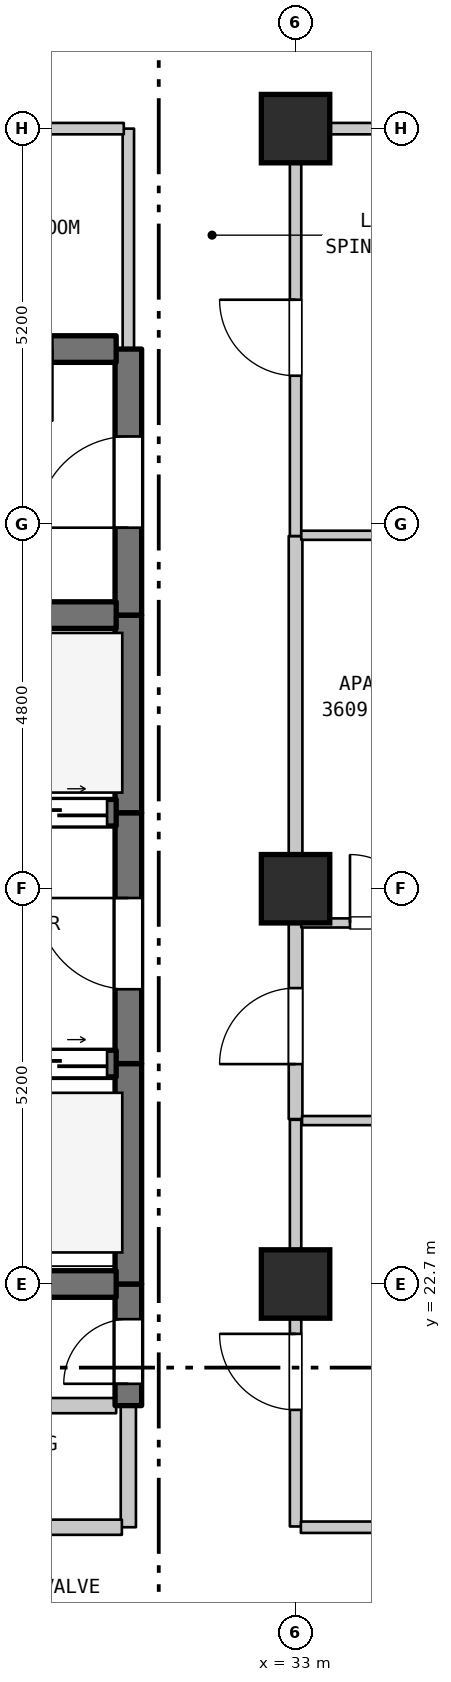
"""IFC4 building model, lengths in metres.
Left out: names, types, materials, properties, quantities, classifications, styles, units other than length and angle.
Written with IfcOpenShell. Run it as: python <this file> out.ifc"""

import sys

from ifc_helpers import new_model, si_unit, direction, frame, frame_2d, origin, origin_2d, place, context, subcontext, project, spatial, rectangle, extrude, element, fill, save


model = new_model("IFC4")
c1 = context("Model", 3, precision=1e-05, world=origin(), true_north=direction((0.0, 1.0)))
c2 = subcontext(c1, "Body", "Model", "MODEL_VIEW")
j1 = project(units=[si_unit("LENGTHUNIT", "METRE"), si_unit("PLANEANGLEUNIT", "RADIAN")], contexts=[c1])
p1 = place(None, origin())
s1 = spatial("IfcSite", under=j1, at=p1, CompositionType="ELEMENT")
p2 = place(p1, origin())
s2 = spatial("IfcBuilding", under=s1, at=p2, CompositionType="ELEMENT")
p3 = place(p2, frame((0.0, 0.0, 148.3)))
s3 = spatial("IfcBuildingStorey", under=s2, at=p3, CompositionType="ELEMENT", Elevation=148.3)
for number, where, z_axis, x_axis in (
    (1, (33.0, 22.7, 0.0), (0.0, 0.0, 1.0), (1.0, 0.0, 0.0)),
    (2, (33.0, 27.9, 0.0), (0.0, 0.0, 1.0), (1.0, 0.0, 0.0)),
    (3, (33.0, 37.9, 0.0), (0.0, 0.0, 1.0), (1.0, 0.0, 0.0)),
):
    element("IfcColumn", number, at=place(p3, frame(where, z_axis=z_axis, x_axis=x_axis)), inside=s3, PredefinedType="COLUMN", context=c2, shape_type="SweptSolid", body=[
        extrude(rectangle(XDim=0.9, YDim=0.9, at=origin_2d()), origin(), (0.0, 0.0, 1.0), 3.7),
    ])
p4 = place(p3, frame((30.8, 19.5, 0.0), z_axis=(0.0, 0.0, 1.0), x_axis=(0.0, 1.0, 0.0)))
e4 = element("IfcWall", 4, at=p4, inside=s3, PredefinedType="STANDARD", context=c2, shape_type="SweptSolid", body=[
    extrude(rectangle(XDim=1.6, YDim=0.2, at=frame_2d((0.8, 0.0))), origin(), (0.0, 0.0, 1.0), 3.385),
])
p5 = place(p3, frame((30.8, 21.1, 0.0), z_axis=(0.0, 0.0, 1.0), x_axis=(0.0, 1.0, 0.0)))
e5 = element("IfcWall", 5, at=p5, inside=s3, PredefinedType="SHEAR", context=c2, shape_type="SweptSolid", body=[
    extrude(rectangle(XDim=1.6, YDim=0.35, at=frame_2d((0.8, 0.0))), origin(), (0.0, 0.0, 1.0), 3.385),
])
p6 = place(p5, frame((0.287, 0.0, 0.0)))
e6 = element("IfcOpeningElement", 6, at=p6, cuts=e5, PredefinedType="OPENING", context=c2, shape_type="SweptSolid", body=[
    extrude(rectangle(XDim=0.85, YDim=2.1, at=frame_2d((0.425, 1.05))), frame((0.0, 0.185, 0.0), z_axis=(0.0, -1.0, 0.0), x_axis=(1.0, 0.0, 0.0)), (0.0, 0.0, 1.0), 0.37),
])
p7 = place(p3, frame((30.8, 22.7, 0.0), z_axis=(0.0, 0.0, 1.0), x_axis=(0.0, 1.0, 0.0)))
e7 = element("IfcWall", 7, at=p7, inside=s3, PredefinedType="SHEAR", context=c2, shape_type="SweptSolid", body=[
    extrude(rectangle(XDim=2.9, YDim=0.35, at=frame_2d((1.45, 0.0))), origin(), (0.0, 0.0, 1.0), 3.385),
])
p8 = place(p3, frame((30.8, 25.6, 0.0), z_axis=(0.0, 0.0, 1.0), x_axis=(0.0, 1.0, 0.0)))
e8 = element("IfcWall", 8, at=p8, inside=s3, PredefinedType="SHEAR", context=c2, shape_type="SweptSolid", body=[
    extrude(rectangle(XDim=3.3, YDim=0.35, at=frame_2d((1.65, 0.0))), origin(), (0.0, 0.0, 1.0), 3.385),
])
p9 = place(p8, frame((0.978, 0.0, 0.0)))
e9 = element("IfcOpeningElement", 9, at=p9, cuts=e8, PredefinedType="OPENING", context=c2, shape_type="SweptSolid", body=[
    extrude(rectangle(XDim=1.2, YDim=2.2, at=frame_2d((0.6, 1.1))), frame((0.0, 0.185, 0.0), z_axis=(0.0, -1.0, 0.0), x_axis=(1.0, 0.0, 0.0)), (0.0, 0.0, 1.0), 0.37),
])
p10 = place(p3, frame((30.8, 28.9, 0.0), z_axis=(0.0, 0.0, 1.0), x_axis=(0.0, 1.0, 0.0)))
e10 = element("IfcWall", 10, at=p10, inside=s3, PredefinedType="SHEAR", context=c2, shape_type="SweptSolid", body=[
    extrude(rectangle(XDim=2.6, YDim=0.35, at=frame_2d((1.3, 0.0))), origin(), (0.0, 0.0, 1.0), 3.385),
])
p11 = place(p3, frame((30.8, 31.5, 0.0), z_axis=(0.0, 0.0, 1.0), x_axis=(0.0, 1.0, 0.0)))
e11 = element("IfcWall", 11, at=p11, inside=s3, PredefinedType="SHEAR", context=c2, shape_type="SweptSolid", body=[
    extrude(rectangle(XDim=3.5, YDim=0.35, at=frame_2d((1.75, 0.0))), origin(), (0.0, 0.0, 1.0), 3.385),
])
p12 = place(p11, frame((1.15, 0.0, 0.0)))
e12 = element("IfcOpeningElement", 12, at=p12, cuts=e11, PredefinedType="OPENING", context=c2, shape_type="SweptSolid", body=[
    extrude(rectangle(XDim=1.2, YDim=2.2, at=frame_2d((0.6, 1.1))), frame((0.0, 0.185, 0.0), z_axis=(0.0, -1.0, 0.0), x_axis=(1.0, 0.0, 0.0)), (0.0, 0.0, 1.0), 0.37),
])
p13 = place(p3, frame((30.8, 35.0, 0.0), z_axis=(0.0, 0.0, 1.0), x_axis=(0.0, 1.0, 0.0)))
e13 = element("IfcWall", 13, at=p13, inside=s3, PredefinedType="STANDARD", context=c2, shape_type="SweptSolid", body=[
    extrude(rectangle(XDim=2.9, YDim=0.15, at=frame_2d((1.45, 0.0))), origin(), (0.0, 0.0, 1.0), 3.385),
])
p14 = place(p3, frame((33.0, 19.51, 0.0), z_axis=(0.0, 0.0, 1.0), x_axis=(0.0, 1.0, 0.0)))
e14 = element("IfcWall", 14, at=p14, inside=s3, PredefinedType="STANDARD", context=c2, shape_type="SweptSolid", body=[
    extrude(rectangle(XDim=5.35, YDim=0.15, at=frame_2d((2.675, 0.0))), origin(), (0.0, 0.0, 1.0), 2.935),
])
p15 = place(p14, frame((1.534, 0.0, 0.0)))
e15 = element("IfcOpeningElement", 15, at=p15, cuts=e14, PredefinedType="OPENING", context=c2, shape_type="SweptSolid", body=[
    extrude(rectangle(XDim=1.0, YDim=2.15, at=frame_2d((0.5, 1.075))), frame((0.0, 0.085, 0.0), z_axis=(0.0, -1.0, 0.0), x_axis=(1.0, 0.0, 0.0)), (0.0, 0.0, 1.0), 0.17),
])
p16 = place(p3, frame((33.0, 24.87, 0.0), z_axis=(0.0, 0.0, 1.0), x_axis=(0.0, 1.0, 0.0)))
e16 = element("IfcWall", 16, at=p16, inside=s3, PredefinedType="STANDARD", context=c2, shape_type="SweptSolid", body=[
    extrude(rectangle(XDim=2.6, YDim=0.18, at=frame_2d((1.3, 0.0))), origin(), (0.0, 0.0, 1.0), 2.935),
])
p17 = place(p16, frame((0.723, 0.0, 0.0)))
e17 = element("IfcOpeningElement", 17, at=p17, cuts=e16, PredefinedType="OPENING", context=c2, shape_type="SweptSolid", body=[
    extrude(rectangle(XDim=1.0, YDim=2.15, at=frame_2d((0.5, 1.075))), frame((0.0, 0.1, 0.0), z_axis=(0.0, -1.0, 0.0), x_axis=(1.0, 0.0, 0.0)), (0.0, 0.0, 1.0), 0.2),
])
p18 = place(p3, frame((33.0, 27.47, 0.0), z_axis=(0.0, 0.0, 1.0), x_axis=(0.0, 1.0, 0.0)))
e18 = element("IfcWall", 18, at=p18, inside=s3, PredefinedType="STANDARD", context=c2, shape_type="SweptSolid", body=[
    extrude(rectangle(XDim=5.07, YDim=0.18, at=frame_2d((2.535, 0.0))), origin(), (0.0, 0.0, 1.0), 2.885),
])
p19 = place(p3, frame((33.0, 32.54, 0.0), z_axis=(0.0, 0.0, 1.0), x_axis=(0.0, 1.0, 0.0)))
e19 = element("IfcWall", 19, at=p19, inside=s3, PredefinedType="STANDARD", context=c2, shape_type="SweptSolid", body=[
    extrude(rectangle(XDim=5.36, YDim=0.15, at=frame_2d((2.68, 0.0))), origin(), (0.0, 0.0, 1.0), 2.885),
])
p20 = place(p19, frame((2.109, 0.0, 0.0)))
e20 = element("IfcOpeningElement", 20, at=p20, cuts=e19, PredefinedType="OPENING", context=c2, shape_type="SweptSolid", body=[
    extrude(rectangle(XDim=1.0, YDim=2.15, at=frame_2d((0.5, 1.075))), frame((0.0, 0.085, 0.0), z_axis=(0.0, -1.0, 0.0), x_axis=(1.0, 0.0, 0.0)), (0.0, 0.0, 1.0), 0.17),
])
p21 = place(p3, frame((27.285, 19.5, 0.0), z_axis=(0.0, 0.0, 1.0), x_axis=(1.0, 0.0, 0.0)))
e21 = element("IfcWall", 21, at=p21, inside=s3, PredefinedType="STANDARD", context=c2, shape_type="SweptSolid", body=[
    extrude(rectangle(XDim=3.43, YDim=0.2, at=frame_2d((1.715, 0.0))), origin(), (0.0, 0.0, 1.0), 3.385),
])
p22 = place(p21, frame((1.192, 0.0, 0.0)))
e22 = element("IfcOpeningElement", 22, at=p22, cuts=e21, PredefinedType="OPENING", context=c2, shape_type="SweptSolid", body=[
    extrude(rectangle(XDim=0.9, YDim=2.15, at=frame_2d((0.45, 1.075))), frame((0.0, 0.11, 0.0), z_axis=(0.0, -1.0, 0.0), x_axis=(1.0, 0.0, 0.0)), (0.0, 0.0, 1.0), 0.22),
])
p23 = place(p3, frame((33.07, 19.5, 0.0), z_axis=(0.0, 0.0, 1.0), x_axis=(1.0, 0.0, 0.0)))
e23 = element("IfcWall", 23, at=p23, inside=s3, PredefinedType="STANDARD", context=c2, shape_type="SweptSolid", body=[
    extrude(rectangle(XDim=21.51, YDim=0.15, at=frame_2d((10.755, 0.0))), origin(), (0.0, 0.0, 1.0), 3.385),
])
p24 = place(p23, frame((10.185, 0.0, 0.0)))
e24 = element("IfcOpeningElement", 24, at=p24, cuts=e23, PredefinedType="OPENING", context=c2, shape_type="SweptSolid", body=[
    extrude(rectangle(XDim=1.0, YDim=2.15, at=frame_2d((0.5, 1.075))), frame((0.0, 0.085, 0.0), z_axis=(0.0, -1.0, 0.0), x_axis=(1.0, 0.0, 0.0)), (0.0, 0.0, 1.0), 0.17),
])
p25 = place(p3, frame((27.285, 21.1, 0.0), z_axis=(0.0, 0.0, 1.0), x_axis=(1.0, 0.0, 0.0)))
e25 = element("IfcWall", 25, at=p25, inside=s3, PredefinedType="STANDARD", context=c2, shape_type="SweptSolid", body=[
    extrude(rectangle(XDim=3.355, YDim=0.2, at=frame_2d((1.677, 0.0))), origin(), (0.0, 0.0, 1.0), 3.385),
])
p26 = place(p3, frame((27.46, 22.7, 0.0), z_axis=(0.0, 0.0, 1.0), x_axis=(1.0, 0.0, 0.0)))
e26 = element("IfcWall", 26, at=p26, inside=s3, PredefinedType="SHEAR", context=c2, shape_type="SweptSolid", body=[
    extrude(rectangle(XDim=3.18, YDim=0.35, at=frame_2d((1.59, 0.0))), origin(), (0.0, 0.0, 1.0), 3.385),
])
p27 = place(p3, frame((33.085, 24.85, 0.0), z_axis=(0.0, 0.0, 1.0), x_axis=(1.0, 0.0, 0.0)))
e27 = element("IfcWall", 27, at=p27, inside=s3, PredefinedType="PARTITIONING", context=c2, shape_type="SweptSolid", body=[
    extrude(rectangle(XDim=23.905, YDim=0.12, at=frame_2d((11.953, 0.0))), origin(), (0.0, 0.0, 1.0), 3.385),
])
p28 = place(p3, frame((27.46, 25.6, 0.0), z_axis=(0.0, 0.0, 1.0), x_axis=(1.0, 0.0, 0.0)))
e28 = element("IfcWall", 28, at=p28, inside=s3, PredefinedType="SHEAR", context=c2, shape_type="SweptSolid", body=[
    extrude(rectangle(XDim=3.18, YDim=0.35, at=frame_2d((1.59, 0.0))), origin(), (0.0, 0.0, 1.0), 3.385),
])
p29 = place(p28, frame((0.12, 0.0, 0.0)))
e29 = element("IfcOpeningElement", 29, at=p29, cuts=e28, PredefinedType="OPENING", context=c2, shape_type="SweptSolid", body=[
    extrude(rectangle(XDim=1.25, YDim=2.2, at=frame_2d((0.625, 1.1))), frame((0.0, 0.185, 0.0), z_axis=(0.0, -1.0, 0.0), x_axis=(1.0, 0.0, 0.0)), (0.0, 0.0, 1.0), 0.37),
])
p30 = place(p28, frame((1.81, 0.0, 0.0)))
e30 = element("IfcOpeningElement", 30, at=p30, cuts=e28, PredefinedType="OPENING", context=c2, shape_type="SweptSolid", body=[
    extrude(rectangle(XDim=1.25, YDim=2.2, at=frame_2d((0.625, 1.1))), frame((0.0, 0.185, 0.0), z_axis=(0.0, -1.0, 0.0), x_axis=(1.0, 0.0, 0.0)), (0.0, 0.0, 1.0), 0.37),
])
p31 = place(p3, frame((33.075, 27.45, 0.0), z_axis=(0.0, 0.0, 1.0), x_axis=(1.0, 0.0, 0.0)))
e31 = element("IfcWall", 31, at=p31, inside=s3, PredefinedType="PARTITIONING", context=c2, shape_type="SweptSolid", body=[
    extrude(rectangle(XDim=2.364, YDim=0.12, at=frame_2d((1.182, 0.0))), origin(), (0.0, 0.0, 1.0), 3.385),
])
p32 = place(p31, frame((0.641, 0.0, 0.0)))
e32 = element("IfcOpeningElement", 32, at=p32, cuts=e31, PredefinedType="OPENING", context=c2, shape_type="SweptSolid", body=[
    extrude(rectangle(XDim=0.9, YDim=2.15, at=frame_2d((0.45, 1.075))), frame((0.0, 0.07, 0.0), z_axis=(0.0, -1.0, 0.0), x_axis=(1.0, 0.0, 0.0)), (0.0, 0.0, 1.0), 0.14),
])
p33 = place(p3, frame((27.46, 28.9, 0.0), z_axis=(0.0, 0.0, 1.0), x_axis=(1.0, 0.0, 0.0)))
e33 = element("IfcWall", 33, at=p33, inside=s3, PredefinedType="SHEAR", context=c2, shape_type="SweptSolid", body=[
    extrude(rectangle(XDim=3.18, YDim=0.35, at=frame_2d((1.59, 0.0))), origin(), (0.0, 0.0, 1.0), 3.385),
])
p34 = place(p33, frame((0.12, 0.0, 0.0)))
e34 = element("IfcOpeningElement", 34, at=p34, cuts=e33, PredefinedType="OPENING", context=c2, shape_type="SweptSolid", body=[
    extrude(rectangle(XDim=1.25, YDim=2.2, at=frame_2d((0.625, 1.1))), frame((0.0, 0.185, 0.0), z_axis=(0.0, -1.0, 0.0), x_axis=(1.0, 0.0, 0.0)), (0.0, 0.0, 1.0), 0.37),
])
p35 = place(p33, frame((1.81, 0.0, 0.0)))
e35 = element("IfcOpeningElement", 35, at=p35, cuts=e33, PredefinedType="OPENING", context=c2, shape_type="SweptSolid", body=[
    extrude(rectangle(XDim=1.25, YDim=2.2, at=frame_2d((0.625, 1.1))), frame((0.0, 0.185, 0.0), z_axis=(0.0, -1.0, 0.0), x_axis=(1.0, 0.0, 0.0)), (0.0, 0.0, 1.0), 0.37),
])
p36 = place(p3, frame((27.46, 31.5, 0.0), z_axis=(0.0, 0.0, 1.0), x_axis=(1.0, 0.0, 0.0)))
e36 = element("IfcWall", 36, at=p36, inside=s3, PredefinedType="SHEAR", context=c2, shape_type="SweptSolid", body=[
    extrude(rectangle(XDim=3.18, YDim=0.35, at=frame_2d((1.59, 0.0))), origin(), (0.0, 0.0, 1.0), 3.385),
])
p37 = place(p3, frame((33.075, 32.55, 0.0), z_axis=(0.0, 0.0, 1.0), x_axis=(1.0, 0.0, 0.0)))
e37 = element("IfcWall", 37, at=p37, inside=s3, PredefinedType="PARTITIONING", context=c2, shape_type="SweptSolid", body=[
    extrude(rectangle(XDim=2.364, YDim=0.12, at=frame_2d((1.182, 0.0))), origin(), (0.0, 0.0, 1.0), 3.385),
])
p38 = place(p3, frame((28.045, 35.0, 0.0), z_axis=(0.0, 0.0, 1.0), x_axis=(1.0, 0.0, 0.0)))
e38 = element("IfcWall", 38, at=p38, inside=s3, PredefinedType="SHEAR", context=c2, shape_type="SweptSolid", body=[
    extrude(rectangle(XDim=2.595, YDim=0.35, at=frame_2d((1.297, 0.0))), origin(), (0.0, 0.0, 1.0), 3.385),
])
p39 = place(p38, frame((0.806, 0.0, 0.0)))
e39 = element("IfcOpeningElement", 39, at=p39, cuts=e38, PredefinedType="OPENING", context=c2, shape_type="SweptSolid", body=[
    extrude(rectangle(XDim=0.95, YDim=2.15, at=frame_2d((0.475, 1.075))), frame((0.0, 0.185, 0.0), z_axis=(0.0, -1.0, 0.0), x_axis=(1.0, 0.0, 0.0)), (0.0, 0.0, 1.0), 0.37),
])
p40 = place(p3, frame((28.045, 37.9, 0.0), z_axis=(0.0, 0.0, 1.0), x_axis=(1.0, 0.0, 0.0)))
e40 = element("IfcWall", 40, at=p40, inside=s3, PredefinedType="STANDARD", context=c2, shape_type="SweptSolid", body=[
    extrude(rectangle(XDim=2.695, YDim=0.15, at=frame_2d((1.348, 0.0))), origin(), (0.0, 0.0, 1.0), 2.885),
])
p41 = place(p3, frame((33.06, 37.9, 0.0), z_axis=(0.0, 0.0, 1.0), x_axis=(1.0, 0.0, 0.0)))
e41 = element("IfcWall", 41, at=p41, inside=s3, PredefinedType="STANDARD", context=c2, shape_type="SweptSolid", body=[
    extrude(rectangle(XDim=11.879, YDim=0.15, at=frame_2d((5.939, 0.0))), origin(), (0.0, 0.0, 1.0), 3.385),
])
p42 = place(p41, frame((5.439, 0.0, 0.0)))
e42 = element("IfcOpeningElement", 42, at=p42, cuts=e41, PredefinedType="OPENING", context=c2, shape_type="SweptSolid", body=[
    extrude(rectangle(XDim=1.0, YDim=2.15, at=frame_2d((0.5, 1.075))), frame((0.0, 0.085, 0.0), z_axis=(0.0, -1.0, 0.0), x_axis=(1.0, 0.0, 0.0)), (0.0, 0.0, 1.0), 0.17),
])
p43 = place(p6, origin())
e43 = element("IfcDoor", 43, at=p43, inside=s3, OperationType="SINGLE_SWING_LEFT", PredefinedType="DOOR", context=c2, shape_type="SweptSolid", body=[
    extrude(rectangle(XDim=0.85, YDim=2.1, at=frame_2d((0.425, 1.05))), frame((0.0, 0.025, 0.0), z_axis=(0.0, -1.0, 0.0), x_axis=(1.0, 0.0, 0.0)), (0.0, 0.0, 1.0), 0.05),
])
fill(e6, e43)
p44 = place(p9, origin())
e44 = element("IfcDoor", 44, at=p44, inside=s3, OperationType="SINGLE_SWING_RIGHT", PredefinedType="DOOR", context=c2, shape_type="SweptSolid", body=[
    extrude(rectangle(XDim=1.2, YDim=2.2, at=frame_2d((0.6, 1.1))), frame((0.0, 0.025, 0.0), z_axis=(0.0, -1.0, 0.0), x_axis=(1.0, 0.0, 0.0)), (0.0, 0.0, 1.0), 0.05),
])
fill(e9, e44)
p45 = place(p12, origin())
e45 = element("IfcDoor", 45, at=p45, inside=s3, OperationType="SINGLE_SWING_LEFT", PredefinedType="DOOR", context=c2, shape_type="SweptSolid", body=[
    extrude(rectangle(XDim=1.2, YDim=2.2, at=frame_2d((0.6, 1.1))), frame((0.0, 0.025, 0.0), z_axis=(0.0, -1.0, 0.0), x_axis=(1.0, 0.0, 0.0)), (0.0, 0.0, 1.0), 0.05),
])
fill(e12, e45)
p46 = place(p15, origin())
e46 = element("IfcDoor", 46, at=p46, inside=s3, OperationType="SINGLE_SWING_RIGHT", PredefinedType="DOOR", context=c2, shape_type="SweptSolid", body=[
    extrude(rectangle(XDim=1.0, YDim=2.15, at=frame_2d((0.5, 1.075))), frame((0.0, 0.025, 0.0), z_axis=(0.0, -1.0, 0.0), x_axis=(1.0, 0.0, 0.0)), (0.0, 0.0, 1.0), 0.05),
])
fill(e15, e46)
p47 = place(p17, origin())
e47 = element("IfcDoor", 47, at=p47, inside=s3, OperationType="SINGLE_SWING_LEFT", PredefinedType="DOOR", context=c2, shape_type="SweptSolid", body=[
    extrude(rectangle(XDim=1.0, YDim=2.15, at=frame_2d((0.5, 1.075))), frame((0.0, 0.025, 0.0), z_axis=(0.0, -1.0, 0.0), x_axis=(1.0, 0.0, 0.0)), (0.0, 0.0, 1.0), 0.05),
])
fill(e17, e47)
p48 = place(p20, origin())
e48 = element("IfcDoor", 48, at=p48, inside=s3, OperationType="SINGLE_SWING_RIGHT", PredefinedType="DOOR", context=c2, shape_type="SweptSolid", body=[
    extrude(rectangle(XDim=1.0, YDim=2.15, at=frame_2d((0.5, 1.075))), frame((0.0, 0.025, 0.0), z_axis=(0.0, -1.0, 0.0), x_axis=(1.0, 0.0, 0.0)), (0.0, 0.0, 1.0), 0.05),
])
fill(e20, e48)
p49 = place(p30, origin())
e49 = element("IfcDoor", 49, at=p49, inside=s3, OperationType="DOUBLE_DOOR_SLIDING", PredefinedType="DOOR", context=c2, shape_type="SweptSolid", body=[
    extrude(rectangle(XDim=1.25, YDim=2.2, at=frame_2d((0.625, 1.1))), frame((0.0, 0.025, 0.0), z_axis=(0.0, -1.0, 0.0), x_axis=(1.0, 0.0, 0.0)), (0.0, 0.0, 1.0), 0.05),
])
fill(e30, e49)
p50 = place(p32, origin())
e50 = element("IfcDoor", 50, at=p50, inside=s3, OperationType="SINGLE_SWING_LEFT", PredefinedType="DOOR", context=c2, shape_type="SweptSolid", body=[
    extrude(rectangle(XDim=0.9, YDim=2.15, at=frame_2d((0.45, 1.075))), frame((0.0, 0.025, 0.0), z_axis=(0.0, -1.0, 0.0), x_axis=(1.0, 0.0, 0.0)), (0.0, 0.0, 1.0), 0.05),
])
fill(e32, e50)
p51 = place(p35, origin())
e51 = element("IfcDoor", 51, at=p51, inside=s3, OperationType="DOUBLE_DOOR_SLIDING", PredefinedType="DOOR", context=c2, shape_type="SweptSolid", body=[
    extrude(rectangle(XDim=1.25, YDim=2.2, at=frame_2d((0.625, 1.1))), frame((0.0, 0.025, 0.0), z_axis=(0.0, -1.0, 0.0), x_axis=(1.0, 0.0, 0.0)), (0.0, 0.0, 1.0), 0.05),
])
fill(e35, e51)
p52 = place(p39, frame((0.95, 0.0, 0.0), z_axis=(0.0, 0.0, 1.0), x_axis=(-1.0, 0.0, 0.0)))
e52 = element("IfcDoor", 52, at=p52, inside=s3, OperationType="SINGLE_SWING_RIGHT", PredefinedType="DOOR", context=c2, shape_type="SweptSolid", body=[
    extrude(rectangle(XDim=0.95, YDim=2.15, at=frame_2d((0.475, 1.075))), frame((0.0, 0.025, 0.0), z_axis=(0.0, -1.0, 0.0), x_axis=(1.0, 0.0, 0.0)), (0.0, 0.0, 1.0), 0.05),
])
fill(e39, e52)
save(model, sys.argv[1])
